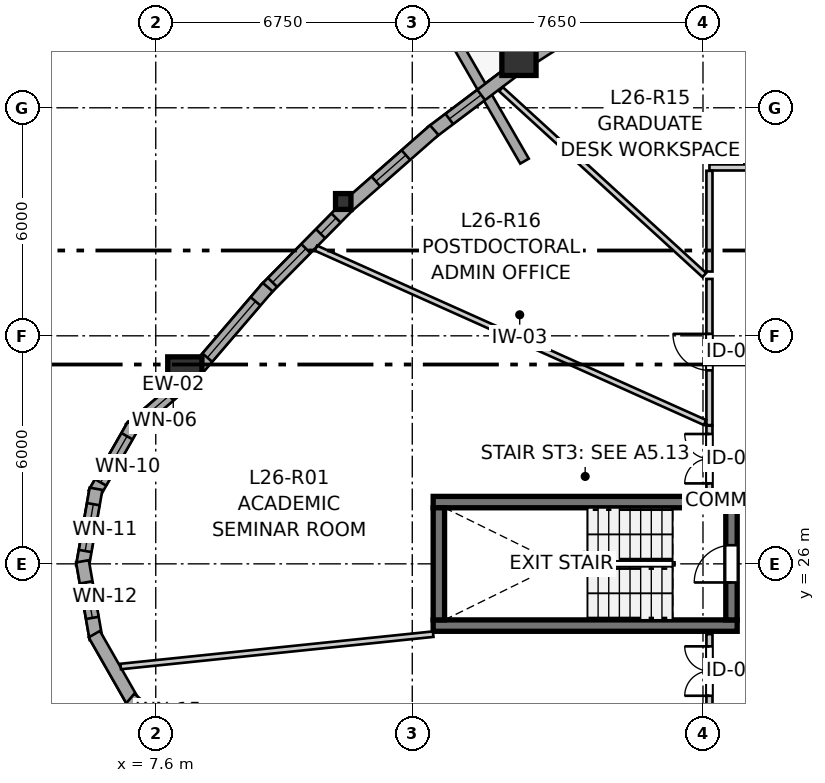
"""IFC4 building model, lengths in metres.
Left out: names, types, materials, properties, quantities, classifications, styles, units other than length and angle.
Written with IfcOpenShell. Run it as: python <this file> out.ifc"""

import sys

from ifc_helpers import new_model, si_unit, direction, frame, frame_2d, origin, origin_2d, place, context, subcontext, project, spatial, rectangle, i_section, extrude, source, transform, mapped, element, fill, save


model = new_model("IFC4")
c1 = context("Model", 3, precision=1e-05, world=origin(), true_north=direction((0.0, 1.0)))
c2 = subcontext(c1, "Body", "Model", "MODEL_VIEW")
j1 = project(units=[si_unit("LENGTHUNIT", "METRE"), si_unit("PLANEANGLEUNIT", "RADIAN")], contexts=[c1])
p1 = place(None, origin())
s1 = spatial("IfcSite", under=j1, at=p1, CompositionType="ELEMENT")
p2 = place(p1, origin())
s2 = spatial("IfcBuilding", under=s1, at=p2, CompositionType="ELEMENT")
p3 = place(p2, frame((0.0, 0.0, 89.6)))
s3 = spatial("IfcBuildingStorey", under=s2, at=p3, CompositionType="ELEMENT", Elevation=89.6)
for number, where, z_axis, x_axis in (
    (1, (14.9, 24.375, 0.0), (0.0, 0.0, 1.0), (1.0, 0.0, 0.0)),
    (2, (22.9, 27.625, 0.0), (0.0, 0.0, 1.0), (-1.0, 0.0, 0.0)),
):
    element("IfcWall", number, at=place(p3, frame(where, z_axis=z_axis, x_axis=x_axis)), inside=s3, PredefinedType="SHEAR", context=c2, shape_type="SweptSolid", body=[
        extrude(rectangle(XDim=8.0, YDim=0.3, at=frame_2d((4.0, 0.0))), origin(), (0.0, 0.0, 1.0), 2.95),
    ])
p4 = place(p3, frame((15.05, 27.475, 0.0), z_axis=(0.0, 0.0, 1.0), x_axis=(0.0, -1.0, 0.0)))
e3 = element("IfcWall", 3, at=p4, inside=s3, PredefinedType="SHEAR", context=c2, shape_type="SweptSolid", body=[
    extrude(rectangle(XDim=2.95, YDim=0.3, at=frame_2d((1.475, 0.0))), origin(), (0.0, 0.0, 1.0), 2.95),
])
p5 = place(p3, frame((22.75, 24.525, 0.0), z_axis=(0.0, 0.0, 1.0), x_axis=(0.0, 1.0, 0.0)))
e4 = element("IfcWall", 4, at=p5, inside=s3, PredefinedType="SHEAR", context=c2, shape_type="SweptSolid", body=[
    extrude(rectangle(XDim=2.95, YDim=0.3, at=frame_2d((1.475, 0.0))), origin(), (0.0, 0.0, 1.0), 2.95),
])
p6 = place(p5, frame((0.985, 0.0, 0.0)))
e5 = element("IfcOpeningElement", 5, at=p6, cuts=e4, PredefinedType="OPENING", context=c2, shape_type="SweptSolid", body=[
    extrude(rectangle(XDim=0.98, YDim=2.15, at=frame_2d((0.49, 1.075))), frame((0.0, 0.16, 0.0), z_axis=(0.0, -1.0, 0.0), x_axis=(1.0, 0.0, 0.0)), (0.0, 0.0, 1.0), 0.32),
])
m1 = source(origin(), c2, "Body", "SweptSolid", [
    extrude(rectangle(XDim=0.9, YDim=0.9, at=origin_2d()), origin(), (0.0, 0.0, 1.0), 2.95),
])
for number, where, z_axis, x_axis in (
    (6, (8.365, 30.996, 0.0), (0.0, 0.0, 1.0), (1.0, 0.0, 0.0)),
    (7, (17.157, 39.301, 0.0), (0.0, 0.0, 1.0), (1.0, 0.0, 0.0)),
):
    element("IfcColumn", number, at=place(p3, frame(where, z_axis=z_axis, x_axis=x_axis)), inside=s3, PredefinedType="COLUMN", context=c2, shape_type="MappedRepresentation", body=[
        mapped(m1, transform((0.0, 0.0, 0.0), x_axis=(1.0, 0.0, 0.0), y_axis=(0.0, 1.0, 0.0), z_axis=(0.0, 0.0, 1.0), scale=1.0)),
    ])
m2 = source(origin(), c2, "Body", "SweptSolid", [
    extrude(i_section(OverallWidth=0.406, OverallDepth=0.416, WebThickness=0.027, FlangeThickness=0.044, FilletRadius=0.015, at=origin_2d()), origin(), (0.0, 0.0, 1.0), 2.95),
])
p7 = place(p3, frame((12.534, 35.535, 0.0), z_axis=(0.0, 0.0, 1.0), x_axis=(1.0, 0.0, 0.0)))
e8 = element("IfcColumn", 8, at=p7, inside=s3, PredefinedType="PILASTER", context=c2, shape_type="MappedRepresentation", body=[
    mapped(m2, transform((0.0, 0.0, 0.0), x_axis=(1.0, 0.0, 0.0), y_axis=(0.0, 1.0, 0.0), z_axis=(0.0, 0.0, 1.0), scale=1.0)),
])
p8 = place(p3, frame((6.792, 54.803, 0.0), z_axis=(0.0, 0.0, 1.0), x_axis=(0.500002250407, -0.866024104508, 0.0)))
e9 = element("IfcWall", 9, at=p8, inside=s3, PredefinedType="PARAPET", context=c2, shape_type="SweptSolid", body=[
    extrude(rectangle(XDim=21.023, YDim=0.26, at=frame_2d((10.511, 0.0))), origin(), (0.0, 0.0, 1.0), 0.55),
])
p9 = place(p3, frame((8.3, 30.718, 0.0), z_axis=(0.0, 0.0, 1.0), x_axis=(-0.761191299493, -0.648527413126, 0.0)))
e10 = element("IfcWall", 10, at=p9, inside=s3, PredefinedType="SOLIDWALL", context=c2, shape_type="SweptSolid", body=[
    extrude(rectangle(XDim=1.805, YDim=0.34, at=frame_2d((0.903, 0.0))), origin(), (0.0, 0.0, 1.0), 2.48),
])
p10 = place(p9, frame((0.452, 0.0, 0.82)))
e11 = element("IfcOpeningElement", 11, at=p10, cuts=e10, PredefinedType="OPENING", context=c2, shape_type="SweptSolid", body=[
    extrude(rectangle(XDim=1.05, YDim=1.45, at=frame_2d((0.525, 0.725))), frame((0.0, 0.18, 0.0), z_axis=(0.0, -1.0, 0.0), x_axis=(1.0, 0.0, 0.0)), (0.0, 0.0, 1.0), 0.36),
])
p11 = place(p3, frame((7.011, 29.65, 0.0), z_axis=(0.0, 0.0, 1.0), x_axis=(-0.496037473582, -0.868301114132, 0.0)))
e12 = element("IfcWall", 12, at=p11, inside=s3, PredefinedType="SOLIDWALL", context=c2, shape_type="SweptSolid", body=[
    extrude(rectangle(XDim=2.073, YDim=0.34, at=frame_2d((1.037, 0.0))), origin(), (0.0, 0.0, 1.0), 2.48),
])
p12 = place(p11, frame((0.336, 0.0, 0.82)))
e13 = element("IfcOpeningElement", 13, at=p12, cuts=e12, PredefinedType="OPENING", context=c2, shape_type="SweptSolid", body=[
    extrude(rectangle(XDim=1.4, YDim=1.35, at=frame_2d((0.7, 0.675))), frame((0.0, 0.18, 0.0), z_axis=(0.0, -1.0, 0.0), x_axis=(1.0, 0.0, 0.0)), (0.0, 0.0, 1.0), 0.36),
])
p13 = place(p3, frame((6.028, 27.975, 0.0), z_axis=(0.0, 0.0, 1.0), x_axis=(-0.172186061474, -0.985064444711, 0.0)))
e14 = element("IfcWall", 14, at=p13, inside=s3, PredefinedType="SOLIDWALL", context=c2, shape_type="SweptSolid", body=[
    extrude(rectangle(XDim=2.073, YDim=0.34, at=frame_2d((1.037, 0.0))), origin(), (0.0, 0.0, 1.0), 2.48),
])
p14 = place(p13, frame((0.412, 0.0, 0.82)))
e15 = element("IfcOpeningElement", 15, at=p14, cuts=e14, PredefinedType="OPENING", context=c2, shape_type="SweptSolid", body=[
    extrude(rectangle(XDim=1.25, YDim=1.35, at=frame_2d((0.625, 0.675))), frame((0.0, 0.18, 0.0), z_axis=(0.0, -1.0, 0.0), x_axis=(1.0, 0.0, 0.0)), (0.0, 0.0, 1.0), 0.36),
])
p15 = place(p3, frame((5.671, 26.067, 0.0), z_axis=(0.0, 0.0, 1.0), x_axis=(0.172186061474, -0.985064444711, 0.0)))
e16 = element("IfcWall", 16, at=p15, inside=s3, PredefinedType="SOLIDWALL", context=c2, shape_type="SweptSolid", body=[
    extrude(rectangle(XDim=2.073, YDim=0.34, at=frame_2d((1.037, 0.0))), origin(), (0.0, 0.0, 1.0), 2.48),
])
p16 = place(p15, frame((0.562, 0.0, 0.82)))
e17 = element("IfcOpeningElement", 17, at=p16, cuts=e16, PredefinedType="OPENING", context=c2, shape_type="SweptSolid", body=[
    extrude(rectangle(XDim=0.95, YDim=1.35, at=frame_2d((0.475, 0.675))), frame((0.0, 0.18, 0.0), z_axis=(0.0, -1.0, 0.0), x_axis=(1.0, 0.0, 0.0)), (0.0, 0.0, 1.0), 0.36),
])
p17 = place(p3, frame((5.983, 24.15, 0.0), z_axis=(0.0, 0.0, 1.0), x_axis=(0.496037473582, -0.868301114132, 0.0)))
e18 = element("IfcWall", 18, at=p17, inside=s3, PredefinedType="SOLIDWALL", context=c2, shape_type="SweptSolid", body=[
    extrude(rectangle(XDim=2.073, YDim=0.34, at=frame_2d((1.037, 0.0))), origin(), (0.0, 0.0, 1.0), 2.48),
])
p18 = place(p3, frame((6.926, 22.453, 0.0), z_axis=(0.0, 0.0, 1.0), x_axis=(0.76114353683, -0.648583469063, 0.0)))
e19 = element("IfcWall", 19, at=p18, inside=s3, PredefinedType="SOLIDWALL", context=c2, shape_type="SweptSolid", body=[
    extrude(rectangle(XDim=2.015, YDim=0.34, at=frame_2d((1.007, 0.0))), origin(), (0.0, 0.0, 1.0), 2.48),
])
p19 = place(p18, frame((0.252, 0.0, 0.82)))
e20 = element("IfcOpeningElement", 20, at=p19, cuts=e19, PredefinedType="OPENING", context=c2, shape_type="SweptSolid", body=[
    extrude(rectangle(XDim=1.45, YDim=1.25, at=frame_2d((0.725, 0.625))), frame((0.0, 0.18, 0.0), z_axis=(0.0, -1.0, 0.0), x_axis=(1.0, 0.0, 0.0)), (0.0, 0.0, 1.0), 0.36),
])
p20 = place(p3, frame((19.764, 40.772, 0.0), z_axis=(0.0, 0.0, 1.0), x_axis=(-0.841500460675, -0.54025639717, 0.0)))
e21 = element("IfcWall", 21, at=p20, inside=s3, PredefinedType="SOLIDWALL", context=c2, shape_type="SweptSolid", body=[
    extrude(rectangle(XDim=2.758, YDim=0.34, at=frame_2d((1.379, 0.0))), origin(), (0.0, 0.0, 1.0), 2.48),
])
p21 = place(p20, frame((0.709, 0.0, 0.82)))
e22 = element("IfcOpeningElement", 22, at=p21, cuts=e21, PredefinedType="OPENING", context=c2, shape_type="SweptSolid", body=[
    extrude(rectangle(XDim=1.35, YDim=1.45, at=frame_2d((0.675, 0.725))), frame((0.0, 0.18, 0.0), z_axis=(0.0, -1.0, 0.0), x_axis=(1.0, 0.0, 0.0)), (0.0, 0.0, 1.0), 0.36),
])
p22 = place(p3, frame((17.076, 39.027, 0.0), z_axis=(0.0, 0.0, 1.0), x_axis=(-0.798403009583, -0.602123437751, 0.0)))
e23 = element("IfcWall", 23, at=p22, inside=s3, PredefinedType="SOLIDWALL", context=c2, shape_type="SweptSolid", body=[
    extrude(rectangle(XDim=2.775, YDim=0.34, at=frame_2d((1.387, 0.0))), origin(), (0.0, 0.0, 1.0), 2.48),
])
p23 = place(p22, frame((1.144, 0.0, 0.82)))
e24 = element("IfcOpeningElement", 24, at=p23, cuts=e23, PredefinedType="OPENING", context=c2, shape_type="SweptSolid", body=[
    extrude(rectangle(XDim=1.05, YDim=1.45, at=frame_2d((0.525, 0.725))), frame((0.0, 0.18, 0.0), z_axis=(0.0, -1.0, 0.0), x_axis=(1.0, 0.0, 0.0)), (0.0, 0.0, 1.0), 0.36),
])
p24 = place(p3, frame((14.929, 37.412, 0.0), z_axis=(0.0, 0.0, 1.0), x_axis=(-0.751438268977, -0.659803400959, 0.0)))
e25 = element("IfcWall", 25, at=p24, inside=s3, PredefinedType="SOLIDWALL", context=c2, shape_type="SweptSolid", body=[
    extrude(rectangle(XDim=3.019, YDim=0.34, at=frame_2d((1.509, 0.0))), origin(), (0.0, 0.0, 1.0), 2.48),
])
p25 = place(p24, frame((0.994, 0.0, 0.82)))
e26 = element("IfcOpeningElement", 26, at=p25, cuts=e25, PredefinedType="OPENING", context=c2, shape_type="SweptSolid", body=[
    extrude(rectangle(XDim=1.05, YDim=1.45, at=frame_2d((0.525, 0.725))), frame((0.0, 0.18, 0.0), z_axis=(0.0, -1.0, 0.0), x_axis=(1.0, 0.0, 0.0)), (0.0, 0.0, 1.0), 0.36),
])
p26 = place(p3, frame((12.641, 35.401, 0.0), z_axis=(0.0, 0.0, 1.0), x_axis=(-0.701955968499, -0.712220343917, 0.0)))
e27 = element("IfcWall", 27, at=p26, inside=s3, PredefinedType="SOLIDWALL", context=c2, shape_type="SweptSolid", body=[
    extrude(rectangle(XDim=3.068, YDim=0.34, at=frame_2d((1.534, 0.0))), origin(), (0.0, 0.0, 1.0), 2.48),
])
p27 = place(p26, frame((0.423, 0.0, 0.82)))
e28 = element("IfcOpeningElement", 28, at=p27, cuts=e27, PredefinedType="OPENING", context=c2, shape_type="SweptSolid", body=[
    extrude(rectangle(XDim=0.58, YDim=1.35, at=frame_2d((0.29, 0.675))), frame((0.0, 0.18, 0.0), z_axis=(0.0, -1.0, 0.0), x_axis=(1.0, 0.0, 0.0)), (0.0, 0.0, 1.0), 0.36),
])
p28 = place(p26, frame((1.552, 0.0, 0.82)))
e29 = element("IfcOpeningElement", 29, at=p28, cuts=e27, PredefinedType="OPENING", context=c2, shape_type="SweptSolid", body=[
    extrude(rectangle(XDim=1.25, YDim=1.35, at=frame_2d((0.625, 0.675))), frame((0.0, 0.18, 0.0), z_axis=(0.0, -1.0, 0.0), x_axis=(1.0, 0.0, 0.0)), (0.0, 0.0, 1.0), 0.36),
])
p29 = place(p3, frame((10.546, 33.28, 0.0), z_axis=(0.0, 0.0, 1.0), x_axis=(-0.6506950883, -0.759339121909, 0.0)))
e30 = element("IfcWall", 30, at=p29, inside=s3, PredefinedType="SOLIDWALL", context=c2, shape_type="SweptSolid", body=[
    extrude(rectangle(XDim=2.924, YDim=0.34, at=frame_2d((1.462, 0.0))), origin(), (0.0, 0.0, 1.0), 2.48),
])
p30 = place(p29, frame((0.492, 0.0, 0.82)))
e31 = element("IfcOpeningElement", 31, at=p30, cuts=e30, PredefinedType="OPENING", context=c2, shape_type="SweptSolid", body=[
    extrude(rectangle(XDim=1.95, YDim=1.4, at=frame_2d((0.975, 0.7))), frame((0.0, 0.18, 0.0), z_axis=(0.0, -1.0, 0.0), x_axis=(1.0, 0.0, 0.0)), (0.0, 0.0, 1.0), 0.36),
])
p31 = place(p3, frame((22.17, 36.43, 0.0), z_axis=(0.0, 0.0, 1.0), x_axis=(1.0, 0.0, 0.0)))
e32 = element("IfcWall", 32, at=p31, inside=s3, PredefinedType="PARTITIONING", context=c2, shape_type="SweptSolid", body=[
    extrude(rectangle(XDim=4.767, YDim=0.16, at=frame_2d((2.384, 0.0))), origin(), (0.0, 0.0, 1.0), 2.588),
])
p32 = place(p31, frame((1.896, 0.0, 0.0)))
e33 = element("IfcOpeningElement", 33, at=p32, cuts=e32, PredefinedType="OPENING", context=c2, shape_type="SweptSolid", body=[
    extrude(rectangle(XDim=0.96, YDim=2.1, at=frame_2d((0.48, 1.05))), frame((0.0, 0.09, 0.0), z_axis=(0.0, -1.0, 0.0), x_axis=(1.0, 0.0, 0.0)), (0.0, 0.0, 1.0), 0.18),
])
p33 = place(p3, frame((22.17, 29.65, 0.0), z_axis=(0.0, 0.0, 1.0), x_axis=(0.0, 1.0, 0.0)))
e34 = element("IfcWall", 34, at=p33, inside=s3, PredefinedType="PARTITIONING", context=c2, shape_type="SweptSolid", body=[
    extrude(rectangle(XDim=3.847, YDim=0.16, at=frame_2d((1.924, 0.0))), origin(), (0.0, 0.0, 1.0), 2.95),
])
p34 = place(p33, frame((1.441, 0.0, 0.0)))
e35 = element("IfcOpeningElement", 35, at=p34, cuts=e34, PredefinedType="OPENING", context=c2, shape_type="SweptSolid", body=[
    extrude(rectangle(XDim=0.96, YDim=2.1, at=frame_2d((0.48, 1.05))), frame((0.0, 0.09, 0.0), z_axis=(0.0, -1.0, 0.0), x_axis=(1.0, 0.0, 0.0)), (0.0, 0.0, 1.0), 0.18),
])
p35 = place(p3, frame((22.17, 22.164, 0.0), z_axis=(0.0, 0.0, 1.0), x_axis=(0.0, 1.0, 0.0)))
e36 = element("IfcWall", 36, at=p35, inside=s3, PredefinedType="PARTITIONING", context=c2, shape_type="SweptSolid", body=[
    extrude(rectangle(XDim=1.986, YDim=0.16, at=frame_2d((0.993, 0.0))), origin(), (0.0, 0.0, 1.0), 2.95),
])
p36 = place(p35, frame((0.365, 0.0, 0.0)))
e37 = element("IfcOpeningElement", 37, at=p36, cuts=e36, PredefinedType="OPENING", context=c2, shape_type="SweptSolid", body=[
    extrude(rectangle(XDim=1.3, YDim=2.1, at=frame_2d((0.65, 1.05))), frame((0.0, 0.09, 0.0), z_axis=(0.0, -1.0, 0.0), x_axis=(1.0, 0.0, 0.0)), (0.0, 0.0, 1.0), 0.18),
])
p37 = place(p3, frame((22.17, 27.85, 0.0), z_axis=(0.0, 0.0, 1.0), x_axis=(0.0, 1.0, 0.0)))
e38 = element("IfcWall", 38, at=p37, inside=s3, PredefinedType="PARTITIONING", context=c2, shape_type="SweptSolid", body=[
    extrude(rectangle(XDim=1.785, YDim=0.16, at=frame_2d((0.893, 0.0))), origin(), (0.0, 0.0, 1.0), 2.95),
])
p38 = place(p37, frame((0.267, 0.0, 0.0)))
e39 = element("IfcOpeningElement", 39, at=p38, cuts=e38, PredefinedType="OPENING", context=c2, shape_type="SweptSolid", body=[
    extrude(rectangle(XDim=1.3, YDim=2.1, at=frame_2d((0.65, 1.05))), frame((0.0, 0.09, 0.0), z_axis=(0.0, -1.0, 0.0), x_axis=(1.0, 0.0, 0.0)), (0.0, 0.0, 1.0), 0.18),
])
p39 = place(p3, frame((11.817, 34.307, 0.0), z_axis=(0.0, 0.0, 1.0), x_axis=(0.912528092457, -0.409014034572, 0.0)))
e40 = element("IfcWall", 40, at=p39, inside=s3, PredefinedType="PARTITIONING", context=c2, shape_type="SweptSolid", body=[
    extrude(rectangle(XDim=11.218, YDim=0.145, at=frame_2d((5.609, 0.0))), origin(), (0.0, 0.0, 1.0), 2.95),
])
p40 = place(p3, frame((6.678, 23.299, 0.0), z_axis=(0.0, 0.0, 1.0), x_axis=(0.994682199009, 0.102991858774, 0.0)))
e41 = element("IfcWall", 41, at=p40, inside=s3, PredefinedType="PARTITIONING", context=c2, shape_type="SweptSolid", body=[
    extrude(rectangle(XDim=8.266, YDim=0.145, at=frame_2d((4.133, 0.0))), origin(), (0.0, 0.0, 1.0), 2.95),
])
p41 = place(p3, frame((16.683, 38.491, 0.0), z_axis=(0.0, 0.0, 1.0), x_axis=(0.738145700324, -0.674641330704, 0.0)))
e42 = element("IfcWall", 42, at=p41, inside=s3, PredefinedType="PARTITIONING", context=c2, shape_type="SweptSolid", body=[
    extrude(rectangle(XDim=7.251, YDim=0.145, at=frame_2d((3.625, 0.0))), origin(), (0.0, 0.0, 1.0), 2.95),
])
p42 = place(p3, frame((22.17, 33.691, 0.0), z_axis=(0.0, 0.0, 1.0), x_axis=(0.0, 1.0, 0.0)))
e43 = element("IfcWall", 43, at=p42, inside=s3, PredefinedType="PARTITIONING", context=c2, shape_type="SweptSolid", body=[
    extrude(rectangle(XDim=2.651, YDim=0.16, at=frame_2d((1.325, 0.0))), origin(), (0.0, 0.0, 1.0), 2.95),
])
m3 = source(origin(), c2, "Body", "SweptSolid", [
    extrude(rectangle(XDim=1.05, YDim=1.45, at=frame_2d((0.525, 0.725))), frame((0.0, 0.03, 0.0), z_axis=(0.0, -1.0, 0.0), x_axis=(1.0, 0.0, 0.0)), (0.0, 0.0, 1.0), 0.06),
])
p43 = place(p10, origin())
e44 = element("IfcWindow", 44, at=p43, inside=s3, PartitioningType="SINGLE_PANEL", PredefinedType="WINDOW", context=c2, shape_type="MappedRepresentation", body=[
    mapped(m3, transform((0.0, 0.0, 0.0), x_axis=(1.0, 0.0, 0.0), y_axis=(0.0, 1.0, 0.0), z_axis=(0.0, 0.0, 1.0), scale=1.0)),
])
fill(e11, e44)
m4 = source(origin(), c2, "Body", "SweptSolid", [
    extrude(rectangle(XDim=1.4, YDim=1.35, at=frame_2d((0.7, 0.675))), frame((0.0, 0.03, 0.0), z_axis=(0.0, -1.0, 0.0), x_axis=(1.0, 0.0, 0.0)), (0.0, 0.0, 1.0), 0.06),
])
p44 = place(p12, origin())
e45 = element("IfcWindow", 45, at=p44, inside=s3, PartitioningType="SINGLE_PANEL", PredefinedType="WINDOW", context=c2, shape_type="MappedRepresentation", body=[
    mapped(m4, transform((0.0, 0.0, 0.0), x_axis=(1.0, 0.0, 0.0), y_axis=(0.0, 1.0, 0.0), z_axis=(0.0, 0.0, 1.0), scale=1.0)),
])
fill(e13, e45)
m5 = source(origin(), c2, "Body", "SweptSolid", [
    extrude(rectangle(XDim=1.25, YDim=1.35, at=frame_2d((0.625, 0.675))), frame((0.0, 0.03, 0.0), z_axis=(0.0, -1.0, 0.0), x_axis=(1.0, 0.0, 0.0)), (0.0, 0.0, 1.0), 0.06),
])
p45 = place(p14, origin())
e46 = element("IfcWindow", 46, at=p45, inside=s3, PartitioningType="SINGLE_PANEL", PredefinedType="WINDOW", context=c2, shape_type="MappedRepresentation", body=[
    mapped(m5, transform((0.0, 0.0, 0.0), x_axis=(1.0, 0.0, 0.0), y_axis=(0.0, 1.0, 0.0), z_axis=(0.0, 0.0, 1.0), scale=1.0)),
])
fill(e15, e46)
m6 = source(origin(), c2, "Body", "SweptSolid", [
    extrude(rectangle(XDim=0.95, YDim=1.35, at=frame_2d((0.475, 0.675))), frame((0.0, 0.03, 0.0), z_axis=(0.0, -1.0, 0.0), x_axis=(1.0, 0.0, 0.0)), (0.0, 0.0, 1.0), 0.06),
])
p46 = place(p16, origin())
e47 = element("IfcWindow", 47, at=p46, inside=s3, PartitioningType="SINGLE_PANEL", PredefinedType="WINDOW", context=c2, shape_type="MappedRepresentation", body=[
    mapped(m6, transform((0.0, 0.0, 0.0), x_axis=(1.0, 0.0, 0.0), y_axis=(0.0, 1.0, 0.0), z_axis=(0.0, 0.0, 1.0), scale=1.0)),
])
fill(e17, e47)
p47 = place(p23, origin())
e48 = element("IfcWindow", 48, at=p47, inside=s3, PartitioningType="SINGLE_PANEL", PredefinedType="WINDOW", context=c2, shape_type="MappedRepresentation", body=[
    mapped(m3, transform((0.0, 0.0, 0.0), x_axis=(1.0, 0.0, 0.0), y_axis=(0.0, 1.0, 0.0), z_axis=(0.0, 0.0, 1.0), scale=1.0)),
])
fill(e24, e48)
p48 = place(p25, origin())
e49 = element("IfcWindow", 49, at=p48, inside=s3, PartitioningType="SINGLE_PANEL", PredefinedType="WINDOW", context=c2, shape_type="MappedRepresentation", body=[
    mapped(m3, transform((0.0, 0.0, 0.0), x_axis=(1.0, 0.0, 0.0), y_axis=(0.0, 1.0, 0.0), z_axis=(0.0, 0.0, 1.0), scale=1.0)),
])
fill(e26, e49)
m7 = source(origin(), c2, "Body", "SweptSolid", [
    extrude(rectangle(XDim=0.58, YDim=1.35, at=frame_2d((0.29, 0.675))), frame((0.0, 0.03, 0.0), z_axis=(0.0, -1.0, 0.0), x_axis=(1.0, 0.0, 0.0)), (0.0, 0.0, 1.0), 0.06),
])
p49 = place(p27, origin())
e50 = element("IfcWindow", 50, at=p49, inside=s3, PartitioningType="SINGLE_PANEL", PredefinedType="WINDOW", context=c2, shape_type="MappedRepresentation", body=[
    mapped(m7, transform((0.0, 0.0, 0.0), x_axis=(1.0, 0.0, 0.0), y_axis=(0.0, 1.0, 0.0), z_axis=(0.0, 0.0, 1.0), scale=1.0)),
])
fill(e28, e50)
p50 = place(p28, origin())
e51 = element("IfcWindow", 51, at=p50, inside=s3, PartitioningType="SINGLE_PANEL", PredefinedType="WINDOW", context=c2, shape_type="MappedRepresentation", body=[
    mapped(m5, transform((0.0, 0.0, 0.0), x_axis=(1.0, 0.0, 0.0), y_axis=(0.0, 1.0, 0.0), z_axis=(0.0, 0.0, 1.0), scale=1.0)),
])
fill(e29, e51)
m8 = source(origin(), c2, "Body", "SweptSolid", [
    extrude(rectangle(XDim=1.95, YDim=1.4, at=frame_2d((0.975, 0.7))), frame((0.0, 0.03, 0.0), z_axis=(0.0, -1.0, 0.0), x_axis=(1.0, 0.0, 0.0)), (0.0, 0.0, 1.0), 0.06),
])
p51 = place(p30, origin())
e52 = element("IfcWindow", 52, at=p51, inside=s3, PartitioningType="SINGLE_PANEL", PredefinedType="WINDOW", context=c2, shape_type="MappedRepresentation", body=[
    mapped(m8, transform((0.0, 0.0, 0.0), x_axis=(1.0, 0.0, 0.0), y_axis=(0.0, 1.0, 0.0), z_axis=(0.0, 0.0, 1.0), scale=1.0)),
])
fill(e31, e52)
m9 = source(origin(), c2, "Body", "SweptSolid", [
    extrude(rectangle(XDim=0.98, YDim=2.15, at=frame_2d((0.49, 1.075))), frame((0.0, 0.025, 0.0), z_axis=(0.0, -1.0, 0.0), x_axis=(1.0, 0.0, 0.0)), (0.0, 0.0, 1.0), 0.05),
])
p52 = place(p6, origin())
e53 = element("IfcDoor", 53, at=p52, inside=s3, OperationType="SINGLE_SWING_LEFT", PredefinedType="DOOR", context=c2, shape_type="MappedRepresentation", body=[
    mapped(m9, transform((0.0, 0.0, 0.0), x_axis=(1.0, 0.0, 0.0), y_axis=(0.0, 1.0, 0.0), z_axis=(0.0, 0.0, 1.0), scale=1.0)),
])
fill(e5, e53)
m10 = source(origin(), c2, "Body", "SweptSolid", [
    extrude(rectangle(XDim=0.96, YDim=2.1, at=frame_2d((0.48, 1.05))), frame((0.0, 0.025, 0.0), z_axis=(0.0, -1.0, 0.0), x_axis=(1.0, 0.0, 0.0)), (0.0, 0.0, 1.0), 0.05),
])
p53 = place(p34, origin())
e54 = element("IfcDoor", 54, at=p53, inside=s3, OperationType="SINGLE_SWING_RIGHT", PredefinedType="DOOR", context=c2, shape_type="MappedRepresentation", body=[
    mapped(m10, transform((0.0, 0.0, 0.0), x_axis=(1.0, 0.0, 0.0), y_axis=(0.0, 1.0, 0.0), z_axis=(0.0, 0.0, 1.0), scale=1.0)),
])
fill(e35, e54)
m11 = source(origin(), c2, "Body", "SweptSolid", [
    extrude(rectangle(XDim=1.3, YDim=2.1, at=frame_2d((0.65, 1.05))), frame((0.0, 0.025, 0.0), z_axis=(0.0, -1.0, 0.0), x_axis=(1.0, 0.0, 0.0)), (0.0, 0.0, 1.0), 0.05),
])
p54 = place(p36, origin())
e55 = element("IfcDoor", 55, at=p54, inside=s3, OperationType="DOUBLE_DOOR_SINGLE_SWING", PredefinedType="DOOR", context=c2, shape_type="MappedRepresentation", body=[
    mapped(m11, transform((0.0, 0.0, 0.0), x_axis=(1.0, 0.0, 0.0), y_axis=(0.0, 1.0, 0.0), z_axis=(0.0, 0.0, 1.0), scale=1.0)),
])
fill(e37, e55)
p55 = place(p38, origin())
e56 = element("IfcDoor", 56, at=p55, inside=s3, OperationType="DOUBLE_DOOR_SINGLE_SWING", PredefinedType="DOOR", context=c2, shape_type="MappedRepresentation", body=[
    mapped(m11, transform((0.0, 0.0, 0.0), x_axis=(1.0, 0.0, 0.0), y_axis=(0.0, 1.0, 0.0), z_axis=(0.0, 0.0, 1.0), scale=1.0)),
])
fill(e39, e56)
save(model, sys.argv[1])
